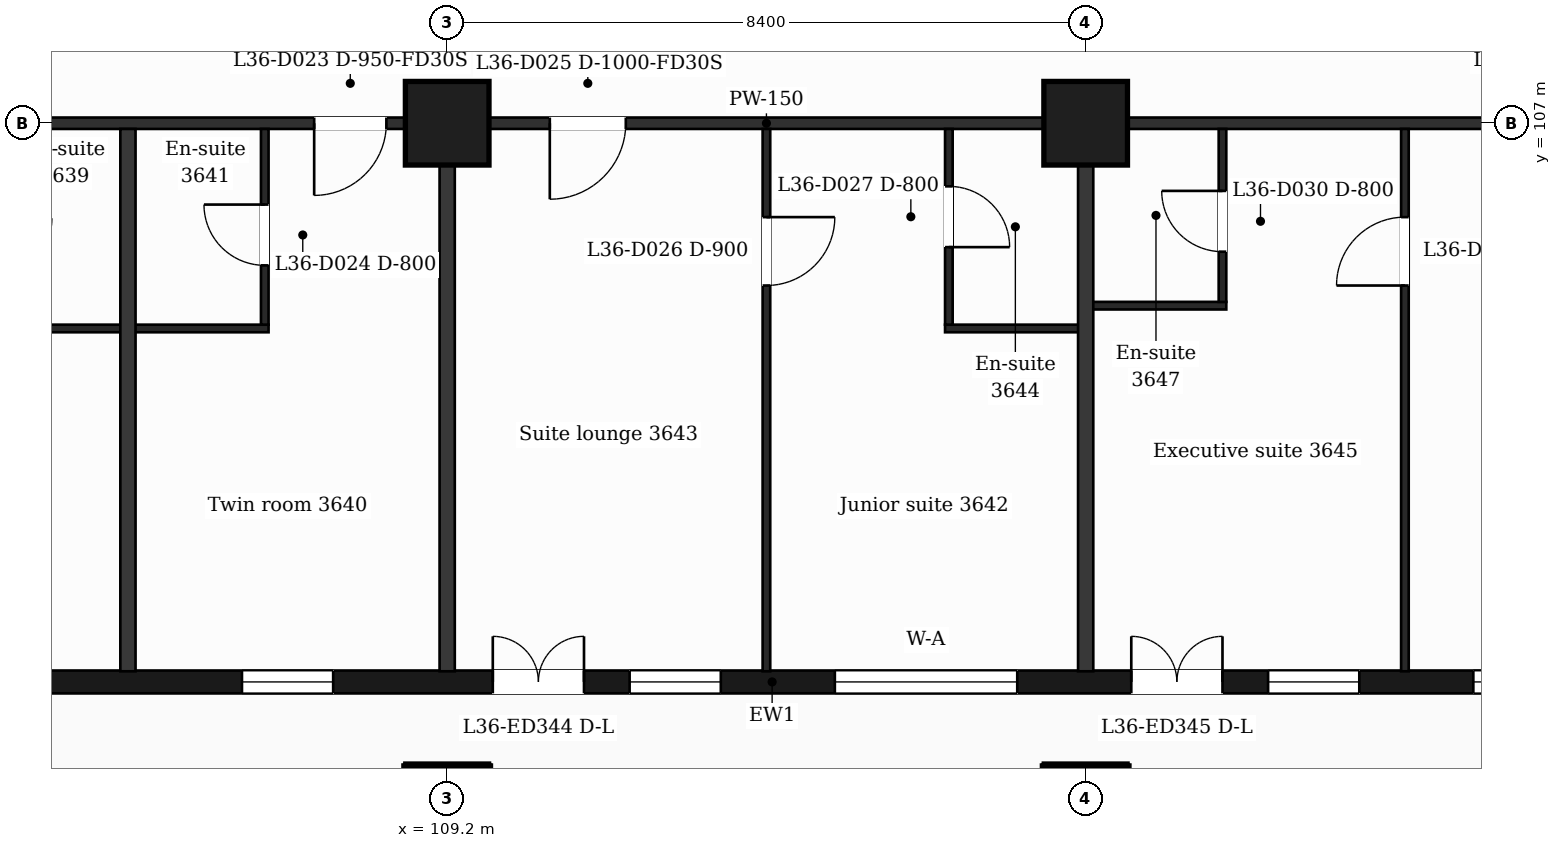
"""IFC4 building model, lengths in metres.
Left out: names, types, materials, properties, quantities, classifications, styles, units other than length and angle.
Written with IfcOpenShell. Run it as: python <this file> out.ifc"""

import sys

from ifc_helpers import new_model, si_unit, direction, frame, frame_2d, origin, origin_2d, place, context, subcontext, project, spatial, rectangle, extrude, element, fill, save


model = new_model("IFC4")
c1 = context("Model", 3, precision=1e-05, world=origin(), true_north=direction((0.0, 1.0)))
c2 = subcontext(c1, "Body", "Model", "MODEL_VIEW")
j1 = project(units=[si_unit("LENGTHUNIT", "METRE"), si_unit("PLANEANGLEUNIT", "RADIAN")], contexts=[c1])
p1 = place(None, origin())
s1 = spatial("IfcSite", under=j1, at=p1, CompositionType="ELEMENT")
p2 = place(p1, origin())
s2 = spatial("IfcBuilding", under=s1, at=p2, CompositionType="ELEMENT")
p3 = place(p2, frame((0.0, 0.0, 155.2)))
s3 = spatial("IfcBuildingStorey", under=s2, at=p3, CompositionType="ELEMENT", Elevation=155.2)
for number, where, z_axis, x_axis in (
    (1, (109.2, 98.0, 0.0), (0.0, 0.0, 1.0), (1.0, 0.0, 0.0)),
    (2, (117.6, 98.0, 0.0), (0.0, 0.0, 1.0), (1.0, 0.0, 0.0)),
    (3, (109.2, 107.0, 0.0), (0.0, 0.0, 1.0), (1.0, 0.0, 0.0)),
    (4, (117.6, 107.0, 0.0), (0.0, 0.0, 1.0), (1.0, 0.0, 0.0)),
):
    element("IfcColumn", number, at=place(p3, frame(where, z_axis=z_axis, x_axis=x_axis)), inside=s3, PredefinedType="COLUMN", context=c2, shape_type="SweptSolid", body=[
        extrude(rectangle(XDim=1.1, YDim=1.1, at=origin_2d()), origin(), (0.0, 0.0, 1.0), 3.7),
    ])
p4 = place(p3, frame((89.85, 99.65, 0.0), z_axis=(0.0, 0.0, 1.0), x_axis=(1.0, 0.0, 0.0)))
e5 = element("IfcWall", 5, at=p4, inside=s3, PredefinedType="SOLIDWALL", context=c2, shape_type="SweptSolid", body=[
    extrude(rectangle(XDim=47.25, YDim=0.3, at=frame_2d((23.625, 0.0))), origin(), (0.0, 0.0, 1.0), 3.38),
])
p5 = place(p4, frame((0.725, 0.0, 0.9)))
e6 = element("IfcOpeningElement", 6, at=p5, cuts=e5, PredefinedType="OPENING", context=c2, shape_type="SweptSolid", body=[
    extrude(rectangle(XDim=1.2, YDim=2.1, at=frame_2d((0.6, 1.05))), frame((0.0, 0.16, 0.0), z_axis=(0.0, -1.0, 0.0), x_axis=(1.0, 0.0, 0.0)), (0.0, 0.0, 1.0), 0.32),
])
p6 = place(p4, frame((3.45, 0.0, 0.9)))
e7 = element("IfcOpeningElement", 7, at=p6, cuts=e5, PredefinedType="OPENING", context=c2, shape_type="SweptSolid", body=[
    extrude(rectangle(XDim=2.4, YDim=2.1, at=frame_2d((1.2, 1.05))), frame((0.0, 0.16, 0.0), z_axis=(0.0, -1.0, 0.0), x_axis=(1.0, 0.0, 0.0)), (0.0, 0.0, 1.0), 0.32),
])
p7 = place(p4, frame((7.65, 0.0, 0.9)))
e8 = element("IfcOpeningElement", 8, at=p7, cuts=e5, PredefinedType="OPENING", context=c2, shape_type="SweptSolid", body=[
    extrude(rectangle(XDim=2.4, YDim=2.1, at=frame_2d((1.2, 1.05))), frame((0.0, 0.16, 0.0), z_axis=(0.0, -1.0, 0.0), x_axis=(1.0, 0.0, 0.0)), (0.0, 0.0, 1.0), 0.32),
])
p8 = place(p4, frame((12.45, 0.0, 0.9)))
e9 = element("IfcOpeningElement", 9, at=p8, cuts=e5, PredefinedType="OPENING", context=c2, shape_type="SweptSolid", body=[
    extrude(rectangle(XDim=1.2, YDim=2.1, at=frame_2d((0.6, 1.05))), frame((0.0, 0.16, 0.0), z_axis=(0.0, -1.0, 0.0), x_axis=(1.0, 0.0, 0.0)), (0.0, 0.0, 1.0), 0.32),
])
p9 = place(p4, frame((16.65, 0.0, 0.9)))
e10 = element("IfcOpeningElement", 10, at=p9, cuts=e5, PredefinedType="OPENING", context=c2, shape_type="SweptSolid", body=[
    extrude(rectangle(XDim=1.2, YDim=2.1, at=frame_2d((0.6, 1.05))), frame((0.0, 0.16, 0.0), z_axis=(0.0, -1.0, 0.0), x_axis=(1.0, 0.0, 0.0)), (0.0, 0.0, 1.0), 0.32),
])
p10 = place(p4, frame((19.95, 0.0, 0.0)))
e11 = element("IfcOpeningElement", 11, at=p10, cuts=e5, PredefinedType="OPENING", context=c2, shape_type="SweptSolid", body=[
    extrude(rectangle(XDim=1.2, YDim=2.4, at=frame_2d((0.6, 1.2))), frame((0.0, 0.16, 0.0), z_axis=(0.0, -1.0, 0.0), x_axis=(1.0, 0.0, 0.0)), (0.0, 0.0, 1.0), 0.32),
])
p11 = place(p4, frame((21.75, 0.0, 0.9)))
e12 = element("IfcOpeningElement", 12, at=p11, cuts=e5, PredefinedType="OPENING", context=c2, shape_type="SweptSolid", body=[
    extrude(rectangle(XDim=1.2, YDim=2.1, at=frame_2d((0.6, 1.05))), frame((0.0, 0.16, 0.0), z_axis=(0.0, -1.0, 0.0), x_axis=(1.0, 0.0, 0.0)), (0.0, 0.0, 1.0), 0.32),
])
p12 = place(p4, frame((24.45, 0.0, 0.9)))
e13 = element("IfcOpeningElement", 13, at=p12, cuts=e5, PredefinedType="OPENING", context=c2, shape_type="SweptSolid", body=[
    extrude(rectangle(XDim=2.4, YDim=2.1, at=frame_2d((1.2, 1.05))), frame((0.0, 0.16, 0.0), z_axis=(0.0, -1.0, 0.0), x_axis=(1.0, 0.0, 0.0)), (0.0, 0.0, 1.0), 0.32),
])
p13 = place(p4, frame((28.35, 0.0, 0.0)))
e14 = element("IfcOpeningElement", 14, at=p13, cuts=e5, PredefinedType="OPENING", context=c2, shape_type="SweptSolid", body=[
    extrude(rectangle(XDim=1.2, YDim=2.4, at=frame_2d((0.6, 1.2))), frame((0.0, 0.16, 0.0), z_axis=(0.0, -1.0, 0.0), x_axis=(1.0, 0.0, 0.0)), (0.0, 0.0, 1.0), 0.32),
])
p14 = place(p4, frame((30.15, 0.0, 0.9)))
e15 = element("IfcOpeningElement", 15, at=p14, cuts=e5, PredefinedType="OPENING", context=c2, shape_type="SweptSolid", body=[
    extrude(rectangle(XDim=1.2, YDim=2.1, at=frame_2d((0.6, 1.05))), frame((0.0, 0.16, 0.0), z_axis=(0.0, -1.0, 0.0), x_axis=(1.0, 0.0, 0.0)), (0.0, 0.0, 1.0), 0.32),
])
p15 = place(p4, frame((32.85, 0.0, 0.9)))
e16 = element("IfcOpeningElement", 16, at=p15, cuts=e5, PredefinedType="OPENING", context=c2, shape_type="SweptSolid", body=[
    extrude(rectangle(XDim=2.4, YDim=2.1, at=frame_2d((1.2, 1.05))), frame((0.0, 0.16, 0.0), z_axis=(0.0, -1.0, 0.0), x_axis=(1.0, 0.0, 0.0)), (0.0, 0.0, 1.0), 0.32),
])
p16 = place(p4, frame((37.05, 0.0, 0.9)))
e17 = element("IfcOpeningElement", 17, at=p16, cuts=e5, PredefinedType="OPENING", context=c2, shape_type="SweptSolid", body=[
    extrude(rectangle(XDim=2.4, YDim=2.1, at=frame_2d((1.2, 1.05))), frame((0.0, 0.16, 0.0), z_axis=(0.0, -1.0, 0.0), x_axis=(1.0, 0.0, 0.0)), (0.0, 0.0, 1.0), 0.32),
])
p17 = place(p4, frame((41.85, 0.0, 0.9)))
e18 = element("IfcOpeningElement", 18, at=p17, cuts=e5, PredefinedType="OPENING", context=c2, shape_type="SweptSolid", body=[
    extrude(rectangle(XDim=1.2, YDim=2.1, at=frame_2d((0.6, 1.05))), frame((0.0, 0.16, 0.0), z_axis=(0.0, -1.0, 0.0), x_axis=(1.0, 0.0, 0.0)), (0.0, 0.0, 1.0), 0.32),
])
p18 = place(p4, frame((45.25, 0.0, 0.9)))
e19 = element("IfcOpeningElement", 19, at=p18, cuts=e5, PredefinedType="OPENING", context=c2, shape_type="SweptSolid", body=[
    extrude(rectangle(XDim=1.2, YDim=2.1, at=frame_2d((0.6, 1.05))), frame((0.0, 0.16, 0.0), z_axis=(0.0, -1.0, 0.0), x_axis=(1.0, 0.0, 0.0)), (0.0, 0.0, 1.0), 0.32),
])
p19 = place(p3, frame((103.15, 104.3, 0.0), z_axis=(0.0, 0.0, 1.0), x_axis=(1.0, 0.0, 0.0)))
e20 = element("IfcWall", 20, at=p19, inside=s3, PredefinedType="PARTITIONING", context=c2, shape_type="SweptSolid", body=[
    extrude(rectangle(XDim=3.7, YDim=0.1, at=frame_2d((1.85, 0.0))), origin(), (0.0, 0.0, 1.0), 3.38),
])
p20 = place(p3, frame((115.75, 104.3, 0.0), z_axis=(0.0, 0.0, 1.0), x_axis=(1.0, 0.0, 0.0)))
e21 = element("IfcWall", 21, at=p20, inside=s3, PredefinedType="PARTITIONING", context=c2, shape_type="SweptSolid", body=[
    extrude(rectangle(XDim=1.85, YDim=0.1, at=frame_2d((0.925, 0.0))), origin(), (0.0, 0.0, 1.0), 3.38),
])
p21 = place(p3, frame((117.6, 104.6, 0.0), z_axis=(0.0, 0.0, 1.0), x_axis=(1.0, 0.0, 0.0)))
e22 = element("IfcWall", 22, at=p21, inside=s3, PredefinedType="PARTITIONING", context=c2, shape_type="SweptSolid", body=[
    extrude(rectangle(XDim=1.85, YDim=0.1, at=frame_2d((0.925, 0.0))), origin(), (0.0, 0.0, 1.0), 3.38),
])
p22 = place(p3, frame((87.018, 107.0, 0.0), z_axis=(0.0, 0.0, 1.0), x_axis=(1.0, 0.0, 0.0)))
e23 = element("IfcWall", 23, at=p22, inside=s3, PredefinedType="PARTITIONING", context=c2, shape_type="SweptSolid", body=[
    extrude(rectangle(XDim=52.765, YDim=0.15, at=frame_2d((26.382, 0.0))), origin(), (0.0, 0.0, 1.0), 3.38),
])
p23 = place(p22, frame((0.707, 0.0, 0.0)))
e24 = element("IfcOpeningElement", 24, at=p23, cuts=e23, PredefinedType="OPENING", context=c2, shape_type="SweptSolid", body=[
    extrude(rectangle(XDim=0.95, YDim=2.1, at=frame_2d((0.475, 1.05))), frame((0.0, 0.085, 0.0), z_axis=(0.0, -1.0, 0.0), x_axis=(1.0, 0.0, 0.0)), (0.0, 0.0, 1.0), 0.17),
])
p24 = place(p22, frame((7.645, 0.0, 0.0)))
e25 = element("IfcOpeningElement", 25, at=p24, cuts=e23, PredefinedType="OPENING", context=c2, shape_type="SweptSolid", body=[
    extrude(rectangle(XDim=0.95, YDim=2.1, at=frame_2d((0.475, 1.05))), frame((0.0, 0.085, 0.0), z_axis=(0.0, -1.0, 0.0), x_axis=(1.0, 0.0, 0.0)), (0.0, 0.0, 1.0), 0.17),
])
p25 = place(p22, frame((12.067, 0.0, 0.0)))
e26 = element("IfcOpeningElement", 26, at=p25, cuts=e23, PredefinedType="OPENING", context=c2, shape_type="SweptSolid", body=[
    extrude(rectangle(XDim=0.95, YDim=2.1, at=frame_2d((0.475, 1.05))), frame((0.0, 0.085, 0.0), z_axis=(0.0, -1.0, 0.0), x_axis=(1.0, 0.0, 0.0)), (0.0, 0.0, 1.0), 0.17),
])
p26 = place(p22, frame((14.582, 0.0, 0.0)))
e27 = element("IfcOpeningElement", 27, at=p26, cuts=e23, PredefinedType="OPENING", context=c2, shape_type="SweptSolid", body=[
    extrude(rectangle(XDim=0.95, YDim=2.1, at=frame_2d((0.475, 1.05))), frame((0.0, 0.085, 0.0), z_axis=(0.0, -1.0, 0.0), x_axis=(1.0, 0.0, 0.0)), (0.0, 0.0, 1.0), 0.17),
])
p27 = place(p22, frame((20.432, 0.0, 0.0)))
e28 = element("IfcOpeningElement", 28, at=p27, cuts=e23, PredefinedType="OPENING", context=c2, shape_type="SweptSolid", body=[
    extrude(rectangle(XDim=0.95, YDim=2.1, at=frame_2d((0.475, 1.05))), frame((0.0, 0.085, 0.0), z_axis=(0.0, -1.0, 0.0), x_axis=(1.0, 0.0, 0.0)), (0.0, 0.0, 1.0), 0.17),
])
p28 = place(p22, frame((23.532, 0.0, 0.0)))
e29 = element("IfcOpeningElement", 29, at=p28, cuts=e23, PredefinedType="OPENING", context=c2, shape_type="SweptSolid", body=[
    extrude(rectangle(XDim=1.0, YDim=2.1, at=frame_2d((0.5, 1.05))), frame((0.0, 0.085, 0.0), z_axis=(0.0, -1.0, 0.0), x_axis=(1.0, 0.0, 0.0)), (0.0, 0.0, 1.0), 0.17),
])
p29 = place(p22, frame((36.807, 0.0, 0.0)))
e30 = element("IfcOpeningElement", 30, at=p29, cuts=e23, PredefinedType="OPENING", context=c2, shape_type="SweptSolid", body=[
    extrude(rectangle(XDim=1.0, YDim=2.1, at=frame_2d((0.5, 1.05))), frame((0.0, 0.085, 0.0), z_axis=(0.0, -1.0, 0.0), x_axis=(1.0, 0.0, 0.0)), (0.0, 0.0, 1.0), 0.17),
])
p30 = place(p22, frame((43.457, 0.0, 0.0)))
e31 = element("IfcOpeningElement", 31, at=p30, cuts=e23, PredefinedType="OPENING", context=c2, shape_type="SweptSolid", body=[
    extrude(rectangle(XDim=0.95, YDim=2.1, at=frame_2d((0.475, 1.05))), frame((0.0, 0.085, 0.0), z_axis=(0.0, -1.0, 0.0), x_axis=(1.0, 0.0, 0.0)), (0.0, 0.0, 1.0), 0.17),
])
p31 = place(p22, frame((48.974, 0.0, 0.0)))
e32 = element("IfcOpeningElement", 32, at=p31, cuts=e23, PredefinedType="OPENING", context=c2, shape_type="SweptSolid", body=[
    extrude(rectangle(XDim=0.95, YDim=2.1, at=frame_2d((0.475, 1.05))), frame((0.0, 0.085, 0.0), z_axis=(0.0, -1.0, 0.0), x_axis=(1.0, 0.0, 0.0)), (0.0, 0.0, 1.0), 0.17),
])
p32 = place(p3, frame((105.0, 99.79, 0.0), z_axis=(0.0, 0.0, 1.0), x_axis=(0.0, 1.0, 0.0)))
e33 = element("IfcWall", 33, at=p32, inside=s3, PredefinedType="PARTITIONING", context=c2, shape_type="SweptSolid", body=[
    extrude(rectangle(XDim=7.135, YDim=0.2, at=frame_2d((3.567, 0.0))), origin(), (0.0, 0.0, 1.0), 3.38),
])
p33 = place(p3, frame((106.8, 104.35, 0.0), z_axis=(0.0, 0.0, 1.0), x_axis=(0.0, 1.0, 0.0)))
e34 = element("IfcWall", 34, at=p33, inside=s3, PredefinedType="PARTITIONING", context=c2, shape_type="SweptSolid", body=[
    extrude(rectangle(XDim=2.575, YDim=0.1, at=frame_2d((1.288, 0.0))), origin(), (0.0, 0.0, 1.0), 3.38),
])
p34 = place(p33, frame((0.78, 0.0, 0.0)))
e35 = element("IfcOpeningElement", 35, at=p34, cuts=e34, PredefinedType="OPENING", context=c2, shape_type="SweptSolid", body=[
    extrude(rectangle(XDim=0.8, YDim=2.1, at=frame_2d((0.4, 1.05))), frame((0.0, 0.06, 0.0), z_axis=(0.0, -1.0, 0.0), x_axis=(1.0, 0.0, 0.0)), (0.0, 0.0, 1.0), 0.12),
])
p35 = place(p3, frame((109.2, 99.79, 0.0), z_axis=(0.0, 0.0, 1.0), x_axis=(0.0, 1.0, 0.0)))
e36 = element("IfcWall", 36, at=p35, inside=s3, PredefinedType="PARTITIONING", context=c2, shape_type="SweptSolid", body=[
    extrude(rectangle(XDim=7.135, YDim=0.2, at=frame_2d((3.567, 0.0))), origin(), (0.0, 0.0, 1.0), 3.38),
])
p36 = place(p3, frame((113.4, 99.79, 0.0), z_axis=(0.0, 0.0, 1.0), x_axis=(0.0, 1.0, 0.0)))
e37 = element("IfcWall", 37, at=p36, inside=s3, PredefinedType="PARTITIONING", context=c2, shape_type="SweptSolid", body=[
    extrude(rectangle(XDim=7.135, YDim=0.1, at=frame_2d((3.567, 0.0))), origin(), (0.0, 0.0, 1.0), 3.38),
])
p37 = place(p36, frame((5.075, 0.0, 0.0)))
e38 = element("IfcOpeningElement", 38, at=p37, cuts=e37, PredefinedType="OPENING", context=c2, shape_type="SweptSolid", body=[
    extrude(rectangle(XDim=0.9, YDim=2.1, at=frame_2d((0.45, 1.05))), frame((0.0, 0.06, 0.0), z_axis=(0.0, -1.0, 0.0), x_axis=(1.0, 0.0, 0.0)), (0.0, 0.0, 1.0), 0.12),
])
p38 = place(p3, frame((115.8, 104.35, 0.0), z_axis=(0.0, 0.0, 1.0), x_axis=(0.0, 1.0, 0.0)))
e39 = element("IfcWall", 39, at=p38, inside=s3, PredefinedType="PARTITIONING", context=c2, shape_type="SweptSolid", body=[
    extrude(rectangle(XDim=2.575, YDim=0.1, at=frame_2d((1.288, 0.0))), origin(), (0.0, 0.0, 1.0), 3.38),
])
p39 = place(p38, frame((1.02, 0.0, 0.0)))
e40 = element("IfcOpeningElement", 40, at=p39, cuts=e39, PredefinedType="OPENING", context=c2, shape_type="SweptSolid", body=[
    extrude(rectangle(XDim=0.8, YDim=2.1, at=frame_2d((0.4, 1.05))), frame((0.0, 0.06, 0.0), z_axis=(0.0, -1.0, 0.0), x_axis=(1.0, 0.0, 0.0)), (0.0, 0.0, 1.0), 0.12),
])
p40 = place(p3, frame((117.6, 99.79, 0.0), z_axis=(0.0, 0.0, 1.0), x_axis=(0.0, 1.0, 0.0)))
e41 = element("IfcWall", 41, at=p40, inside=s3, PredefinedType="PARTITIONING", context=c2, shape_type="SweptSolid", body=[
    extrude(rectangle(XDim=7.135, YDim=0.2, at=frame_2d((3.567, 0.0))), origin(), (0.0, 0.0, 1.0), 3.38),
])
p41 = place(p3, frame((119.4, 104.65, 0.0), z_axis=(0.0, 0.0, 1.0), x_axis=(0.0, 1.0, 0.0)))
e42 = element("IfcWall", 42, at=p41, inside=s3, PredefinedType="PARTITIONING", context=c2, shape_type="SweptSolid", body=[
    extrude(rectangle(XDim=2.275, YDim=0.1, at=frame_2d((1.138, 0.0))), origin(), (0.0, 0.0, 1.0), 3.38),
])
p42 = place(p41, frame((0.66, 0.0, 0.0)))
e43 = element("IfcOpeningElement", 43, at=p42, cuts=e42, PredefinedType="OPENING", context=c2, shape_type="SweptSolid", body=[
    extrude(rectangle(XDim=0.8, YDim=2.1, at=frame_2d((0.4, 1.05))), frame((0.0, 0.06, 0.0), z_axis=(0.0, -1.0, 0.0), x_axis=(1.0, 0.0, 0.0)), (0.0, 0.0, 1.0), 0.12),
])
p43 = place(p3, frame((121.8, 99.79, 0.0), z_axis=(0.0, 0.0, 1.0), x_axis=(0.0, 1.0, 0.0)))
e44 = element("IfcWall", 44, at=p43, inside=s3, PredefinedType="PARTITIONING", context=c2, shape_type="SweptSolid", body=[
    extrude(rectangle(XDim=7.135, YDim=0.1, at=frame_2d((3.567, 0.0))), origin(), (0.0, 0.0, 1.0), 3.38),
])
p44 = place(p43, frame((5.075, 0.0, 0.0)))
e45 = element("IfcOpeningElement", 45, at=p44, cuts=e44, PredefinedType="OPENING", context=c2, shape_type="SweptSolid", body=[
    extrude(rectangle(XDim=0.9, YDim=2.1, at=frame_2d((0.45, 1.05))), frame((0.0, 0.06, 0.0), z_axis=(0.0, -1.0, 0.0), x_axis=(1.0, 0.0, 0.0)), (0.0, 0.0, 1.0), 0.12),
])
p45 = place(p9, origin())
e46 = element("IfcWindow", 46, at=p45, inside=s3, PartitioningType="SINGLE_PANEL", PredefinedType="WINDOW", context=c2, shape_type="SweptSolid", body=[
    extrude(rectangle(XDim=1.2, YDim=2.1, at=frame_2d((0.6, 1.05))), frame((0.0, 0.03, 0.0), z_axis=(0.0, -1.0, 0.0), x_axis=(1.0, 0.0, 0.0)), (0.0, 0.0, 1.0), 0.06),
])
fill(e10, e46)
p46 = place(p10, origin())
e47 = element("IfcDoor", 47, at=p46, inside=s3, OperationType="DOUBLE_DOOR_SINGLE_SWING", PredefinedType="DOOR", context=c2, shape_type="SweptSolid", body=[
    extrude(rectangle(XDim=1.2, YDim=2.4, at=frame_2d((0.6, 1.2))), frame((0.0, 0.025, 0.0), z_axis=(0.0, -1.0, 0.0), x_axis=(1.0, 0.0, 0.0)), (0.0, 0.0, 1.0), 0.05),
])
fill(e11, e47)
p47 = place(p11, origin())
e48 = element("IfcWindow", 48, at=p47, inside=s3, PartitioningType="SINGLE_PANEL", PredefinedType="WINDOW", context=c2, shape_type="SweptSolid", body=[
    extrude(rectangle(XDim=1.2, YDim=2.1, at=frame_2d((0.6, 1.05))), frame((0.0, 0.03, 0.0), z_axis=(0.0, -1.0, 0.0), x_axis=(1.0, 0.0, 0.0)), (0.0, 0.0, 1.0), 0.06),
])
fill(e12, e48)
p48 = place(p12, origin())
e49 = element("IfcWindow", 49, at=p48, inside=s3, PartitioningType="SINGLE_PANEL", PredefinedType="WINDOW", context=c2, shape_type="SweptSolid", body=[
    extrude(rectangle(XDim=2.4, YDim=2.1, at=frame_2d((1.2, 1.05))), frame((0.0, 0.03, 0.0), z_axis=(0.0, -1.0, 0.0), x_axis=(1.0, 0.0, 0.0)), (0.0, 0.0, 1.0), 0.06),
])
fill(e13, e49)
p49 = place(p13, origin())
e50 = element("IfcDoor", 50, at=p49, inside=s3, OperationType="DOUBLE_DOOR_SINGLE_SWING", PredefinedType="DOOR", context=c2, shape_type="SweptSolid", body=[
    extrude(rectangle(XDim=1.2, YDim=2.4, at=frame_2d((0.6, 1.2))), frame((0.0, 0.025, 0.0), z_axis=(0.0, -1.0, 0.0), x_axis=(1.0, 0.0, 0.0)), (0.0, 0.0, 1.0), 0.05),
])
fill(e14, e50)
p50 = place(p14, origin())
e51 = element("IfcWindow", 51, at=p50, inside=s3, PartitioningType="SINGLE_PANEL", PredefinedType="WINDOW", context=c2, shape_type="SweptSolid", body=[
    extrude(rectangle(XDim=1.2, YDim=2.1, at=frame_2d((0.6, 1.05))), frame((0.0, 0.03, 0.0), z_axis=(0.0, -1.0, 0.0), x_axis=(1.0, 0.0, 0.0)), (0.0, 0.0, 1.0), 0.06),
])
fill(e15, e51)
p51 = place(p15, origin())
e52 = element("IfcWindow", 52, at=p51, inside=s3, PartitioningType="SINGLE_PANEL", PredefinedType="WINDOW", context=c2, shape_type="SweptSolid", body=[
    extrude(rectangle(XDim=2.4, YDim=2.1, at=frame_2d((1.2, 1.05))), frame((0.0, 0.03, 0.0), z_axis=(0.0, -1.0, 0.0), x_axis=(1.0, 0.0, 0.0)), (0.0, 0.0, 1.0), 0.06),
])
fill(e16, e52)
p52 = place(p27, origin())
e53 = element("IfcDoor", 53, at=p52, inside=s3, OperationType="SINGLE_SWING_LEFT", PredefinedType="DOOR", context=c2, shape_type="SweptSolid", body=[
    extrude(rectangle(XDim=0.95, YDim=2.1, at=frame_2d((0.475, 1.05))), frame((0.0, 0.025, 0.0), z_axis=(0.0, -1.0, 0.0), x_axis=(1.0, 0.0, 0.0)), (0.0, 0.0, 1.0), 0.05),
])
fill(e28, e53)
p53 = place(p34, origin())
e54 = element("IfcDoor", 54, at=p53, inside=s3, OperationType="SINGLE_SWING_RIGHT", PredefinedType="DOOR", context=c2, shape_type="SweptSolid", body=[
    extrude(rectangle(XDim=0.8, YDim=2.1, at=frame_2d((0.4, 1.05))), frame((0.0, 0.025, 0.0), z_axis=(0.0, -1.0, 0.0), x_axis=(1.0, 0.0, 0.0)), (0.0, 0.0, 1.0), 0.05),
])
fill(e35, e54)
p54 = place(p28, origin())
e55 = element("IfcDoor", 55, at=p54, inside=s3, OperationType="SINGLE_SWING_LEFT", PredefinedType="DOOR", context=c2, shape_type="SweptSolid", body=[
    extrude(rectangle(XDim=1.0, YDim=2.1, at=frame_2d((0.5, 1.05))), frame((0.0, 0.025, 0.0), z_axis=(0.0, -1.0, 0.0), x_axis=(1.0, 0.0, 0.0)), (0.0, 0.0, 1.0), 0.05),
])
fill(e29, e55)
p55 = place(p37, origin())
e56 = element("IfcDoor", 56, at=p55, inside=s3, OperationType="SINGLE_SWING_RIGHT", PredefinedType="DOOR", context=c2, shape_type="SweptSolid", body=[
    extrude(rectangle(XDim=0.9, YDim=2.1, at=frame_2d((0.45, 1.05))), frame((0.0, 0.025, 0.0), z_axis=(0.0, -1.0, 0.0), x_axis=(1.0, 0.0, 0.0)), (0.0, 0.0, 1.0), 0.05),
])
fill(e38, e56)
p56 = place(p39, origin())
e57 = element("IfcDoor", 57, at=p56, inside=s3, OperationType="SINGLE_SWING_LEFT", PredefinedType="DOOR", context=c2, shape_type="SweptSolid", body=[
    extrude(rectangle(XDim=0.8, YDim=2.1, at=frame_2d((0.4, 1.05))), frame((0.0, 0.025, 0.0), z_axis=(0.0, -1.0, 0.0), x_axis=(1.0, 0.0, 0.0)), (0.0, 0.0, 1.0), 0.05),
])
fill(e40, e57)
p57 = place(p44, origin())
e58 = element("IfcDoor", 58, at=p57, inside=s3, OperationType="SINGLE_SWING_LEFT", PredefinedType="DOOR", context=c2, shape_type="SweptSolid", body=[
    extrude(rectangle(XDim=0.9, YDim=2.1, at=frame_2d((0.45, 1.05))), frame((0.0, 0.025, 0.0), z_axis=(0.0, -1.0, 0.0), x_axis=(1.0, 0.0, 0.0)), (0.0, 0.0, 1.0), 0.05),
])
fill(e45, e58)
p58 = place(p42, origin())
e59 = element("IfcDoor", 59, at=p58, inside=s3, OperationType="SINGLE_SWING_RIGHT", PredefinedType="DOOR", context=c2, shape_type="SweptSolid", body=[
    extrude(rectangle(XDim=0.8, YDim=2.1, at=frame_2d((0.4, 1.05))), frame((0.0, 0.025, 0.0), z_axis=(0.0, -1.0, 0.0), x_axis=(1.0, 0.0, 0.0)), (0.0, 0.0, 1.0), 0.05),
])
fill(e43, e59)
save(model, sys.argv[1])
